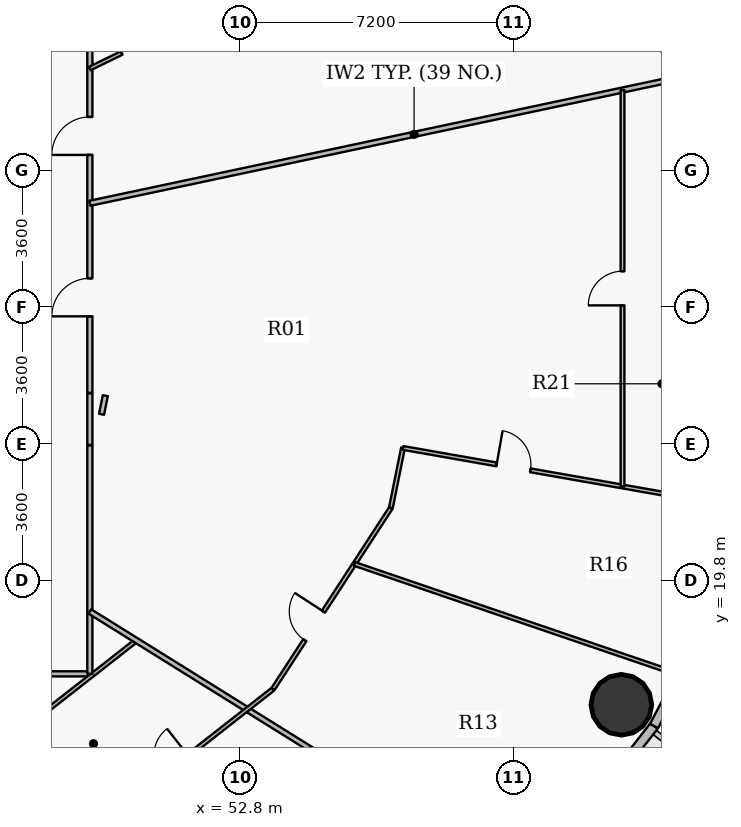
"""IFC4 building model, lengths in metres.
Left out: names, types, materials, properties, quantities, classifications, styles, units other than length and angle.
Written with IfcOpenShell. Run it as: python <this file> out.ifc"""

import sys

from ifc_helpers import new_model, si_unit, direction, frame, frame_2d, origin, origin_2d, place, context, subcontext, project, spatial, rectangle, hollow_circle, extrude, source, transform, mapped, element, fill, save


model = new_model("IFC4")
c1 = context("Model", 3, precision=1e-05, world=origin(), true_north=direction((0.0, 1.0)))
c2 = subcontext(c1, "Body", "Model", "MODEL_VIEW")
j1 = project(units=[si_unit("LENGTHUNIT", "METRE"), si_unit("PLANEANGLEUNIT", "RADIAN")], contexts=[c1])
p1 = place(None, origin())
s1 = spatial("IfcSite", under=j1, at=p1, CompositionType="ELEMENT")
p2 = place(p1, origin())
s2 = spatial("IfcBuilding", under=s1, at=p2, CompositionType="ELEMENT")
p3 = place(p2, frame((0.0, 0.0, 66.0)))
s3 = spatial("IfcBuildingStorey", under=s2, at=p3, CompositionType="ELEMENT", Elevation=66.0)
for number, where, z_axis, x_axis in (
    (1, (64.611, 34.109, 0.0), (0.0, 0.0, 1.0), (1.0, 0.0, 0.0)),
    (2, (62.835, 16.536, 0.0), (0.0, 0.0, 1.0), (1.0, 0.0, 0.0)),
):
    element("IfcColumn", number, at=place(p3, frame(where, z_axis=z_axis, x_axis=x_axis)), inside=s3, PredefinedType="COLUMN", context=c2, shape_type="SweptSolid", body=[
        extrude(hollow_circle(Radius=0.8, WallThickness=0.045, at=origin_2d()), origin(), (0.0, 0.0, 1.0), 4.2),
    ])
p4 = place(p3, frame((63.695, 15.977, 0.0), z_axis=(0.0, 0.0, 1.0), x_axis=(-0.616295508253, -0.787514981767, 0.0)))
e3 = element("IfcWall", 3, at=p4, inside=s3, PredefinedType="SOLIDWALL", context=c2, shape_type="SweptSolid", body=[
    extrude(rectangle(XDim=4.129, YDim=0.24, at=frame_2d((2.065, 0.0))), origin(), (0.0, 0.0, 1.0), 3.95),
])
p5 = place(p4, frame((1.44, 0.0, 0.9)))
e4 = element("IfcOpeningElement", 4, at=p5, cuts=e3, PredefinedType="OPENING", context=c2, shape_type="SweptSolid", body=[
    extrude(rectangle(XDim=1.25, YDim=1.65, at=origin_2d()), frame((0.625, 0.13, 0.825), z_axis=(0.0, -1.0, 0.0), x_axis=(1.0, 0.0, 0.0)), (0.0, 0.0, 1.0), 0.26),
])
p6 = place(p3, frame((65.558, 19.499, 0.0), z_axis=(0.0, 0.0, 1.0), x_axis=(-0.467662443071, -0.883907144072, 0.0)))
e5 = element("IfcWall", 5, at=p6, inside=s3, PredefinedType="SOLIDWALL", context=c2, shape_type="SweptSolid", body=[
    extrude(rectangle(XDim=3.984, YDim=0.24, at=frame_2d((1.992, 0.0))), origin(), (0.0, 0.0, 1.0), 3.95),
])
p7 = place(p6, frame((0.817, 0.0, 0.9)))
e6 = element("IfcOpeningElement", 6, at=p7, cuts=e5, PredefinedType="OPENING", context=c2, shape_type="SweptSolid", body=[
    extrude(rectangle(XDim=1.25, YDim=1.65, at=origin_2d()), frame((0.625, 0.13, 0.825), z_axis=(0.0, -1.0, 0.0), x_axis=(1.0, 0.0, 0.0)), (0.0, 0.0, 1.0), 0.26),
])
p8 = place(p3, frame((37.362, 17.35, 0.0), z_axis=(0.0, 0.0, 1.0), x_axis=(1.0, 0.0, 0.0)))
e7 = element("IfcWall", 7, at=p8, inside=s3, PredefinedType="PARTITIONING", context=c2, shape_type="SweptSolid", body=[
    extrude(rectangle(XDim=11.488, YDim=0.135, at=frame_2d((5.744, 0.0))), origin(), (0.0, 0.0, 1.0), 3.285),
])
p9 = place(p8, frame((1.625, 0.0, 0.0)))
e8 = element("IfcOpeningElement", 8, at=p9, cuts=e7, PredefinedType="OPENING", context=c2, shape_type="SweptSolid", body=[
    extrude(rectangle(XDim=1.0, YDim=2.15, at=origin_2d()), frame((0.5, 0.078, 1.075), z_axis=(0.0, -1.0, 0.0), x_axis=(1.0, 0.0, 0.0)), (0.0, 0.0, 1.0), 0.155),
])
p10 = place(p8, frame((5.589, 0.0, 0.0)))
e9 = element("IfcOpeningElement", 9, at=p10, cuts=e7, PredefinedType="OPENING", context=c2, shape_type="SweptSolid", body=[
    extrude(rectangle(XDim=1.0, YDim=2.15, at=origin_2d()), frame((0.5, 0.078, 1.075), z_axis=(0.0, -1.0, 0.0), x_axis=(1.0, 0.0, 0.0)), (0.0, 0.0, 1.0), 0.155),
])
p11 = place(p3, frame((41.572, 17.35, 0.0), z_axis=(0.0, 0.0, 1.0), x_axis=(0.499990052844, -0.866031146701, 0.0)))
e10 = element("IfcWall", 10, at=p11, inside=s3, PredefinedType="PARTITIONING", context=c2, shape_type="SweptSolid", body=[
    extrude(rectangle(XDim=14.373, YDim=0.135, at=frame_2d((7.187, 0.0))), origin(), (0.0, 0.0, 1.0), 3.335),
])
p12 = place(p3, frame((45.33, 17.35, 0.0), z_axis=(0.0, 0.0, 1.0), x_axis=(0.695082659364, -0.718929827348, 0.0)))
e11 = element("IfcWall", 11, at=p12, inside=s3, PredefinedType="PARTITIONING", context=c2, shape_type="SweptSolid", body=[
    extrude(rectangle(XDim=5.487, YDim=0.1, at=frame_2d((2.744, 0.0))), origin(), (0.0, 0.0, 1.0), 3.95),
])
p13 = place(p12, frame((1.1, 0.0, 0.0)))
e12 = element("IfcOpeningElement", 12, at=p13, cuts=e11, PredefinedType="OPENING", context=c2, shape_type="SweptSolid", body=[
    extrude(rectangle(XDim=0.82, YDim=2.1, at=origin_2d()), frame((0.41, 0.06, 1.05), z_axis=(0.0, -1.0, 0.0), x_axis=(1.0, 0.0, 0.0)), (0.0, 0.0, 1.0), 0.12),
])
p14 = place(p3, frame((46.891, 15.736, 0.0), z_axis=(0.0, 0.0, 1.0), x_axis=(0.787335515078, 0.61652476568, 0.0)))
e13 = element("IfcWall", 13, at=p14, inside=s3, PredefinedType="PARTITIONING", context=c2, shape_type="SweptSolid", body=[
    extrude(rectangle(XDim=4.043, YDim=0.1, at=frame_2d((2.022, 0.0))), origin(), (0.0, 0.0, 1.0), 3.285),
])
p15 = place(p3, frame((48.85, 17.35, 0.0), z_axis=(0.0, 0.0, 1.0), x_axis=(0.0, 1.0, 0.0)))
e14 = element("IfcWall", 14, at=p15, inside=s3, PredefinedType="PARTITIONING", context=c2, shape_type="SweptSolid", body=[
    extrude(rectangle(XDim=6.011, YDim=0.135, at=frame_2d((3.006, 0.0))), origin(), (0.0, 0.0, 1.0), 3.285),
])
p16 = place(p3, frame((48.85, 18.991, 0.0), z_axis=(0.0, 0.0, 1.0), x_axis=(0.848674864049, -0.528914903488, 0.0)))
e15 = element("IfcWall", 15, at=p16, inside=s3, PredefinedType="PARTITIONING", context=c2, shape_type="SweptSolid", body=[
    extrude(rectangle(XDim=13.427, YDim=0.135, at=frame_2d((6.714, 0.0))), origin(), (0.0, 0.0, 1.0), 3.335),
])
p17 = place(p3, frame((48.85, 24.742, 0.0), z_axis=(0.0, 0.0, 1.0), x_axis=(0.0, 1.0, 0.0)))
e16 = element("IfcWall", 16, at=p17, inside=s3, PredefinedType="PARTITIONING", context=c2, shape_type="SweptSolid", body=[
    extrude(rectangle(XDim=11.908, YDim=0.135, at=frame_2d((5.954, 0.0))), origin(), (0.0, 0.0, 1.0), 3.285),
])
p18 = place(p17, frame((6.262, 0.0, 0.0)))
e17 = element("IfcOpeningElement", 17, at=p18, cuts=e16, PredefinedType="OPENING", context=c2, shape_type="SweptSolid", body=[
    extrude(rectangle(XDim=1.0, YDim=2.15, at=origin_2d()), frame((0.5, 0.078, 1.075), z_axis=(0.0, -1.0, 0.0), x_axis=(1.0, 0.0, 0.0)), (0.0, 0.0, 1.0), 0.155),
])
p19 = place(p17, frame((2.015, 0.0, 0.0)))
e18 = element("IfcOpeningElement", 18, at=p19, cuts=e16, PredefinedType="OPENING", context=c2, shape_type="SweptSolid", body=[
    extrude(rectangle(XDim=1.0, YDim=2.15, at=origin_2d()), frame((0.5, 0.078, 1.075), z_axis=(0.0, -1.0, 0.0), x_axis=(1.0, 0.0, 0.0)), (0.0, 0.0, 1.0), 0.155),
])
p20 = place(p3, frame((48.85, 29.731, 0.0), z_axis=(0.0, 0.0, 1.0), x_axis=(0.97814985104, 0.207901103679, 0.0)))
e19 = element("IfcWall", 19, at=p20, inside=s3, PredefinedType="PARTITIONING", context=c2, shape_type="SweptSolid", body=[
    extrude(rectangle(XDim=17.444, YDim=0.135, at=frame_2d((8.722, 0.0))), origin(), (0.0, 0.0, 1.0), 3.335),
])
p21 = place(p3, frame((48.85, 33.277, 0.0), z_axis=(0.0, 0.0, 1.0), x_axis=(0.898537268474, 0.438897228476, 0.0)))
e20 = element("IfcWall", 20, at=p21, inside=s3, PredefinedType="PARTITIONING", context=c2, shape_type="SweptSolid", body=[
    extrude(rectangle(XDim=6.144, YDim=0.1, at=frame_2d((3.072, 0.0))), origin(), (0.0, 0.0, 1.0), 3.95),
])
p22 = place(p21, frame((0.93, 0.0, 0.0)))
e21 = element("IfcOpeningElement", 21, at=p22, cuts=e20, PredefinedType="OPENING", context=c2, shape_type="SweptSolid", body=[
    extrude(rectangle(XDim=0.82, YDim=2.1, at=origin_2d()), frame((0.41, 0.06, 1.05), z_axis=(0.0, -1.0, 0.0), x_axis=(1.0, 0.0, 0.0)), (0.0, 0.0, 1.0), 0.12),
])
p23 = place(p3, frame((49.144, 13.405, 0.0), z_axis=(0.0, 0.0, 1.0), x_axis=(0.787337339938, 0.616522435228, 0.0)))
e22 = element("IfcWall", 22, at=p23, inside=s3, PredefinedType="PARTITIONING", context=c2, shape_type="SweptSolid", body=[
    extrude(rectangle(XDim=5.747, YDim=0.1, at=frame_2d((2.874, 0.0))), origin(), (0.0, 0.0, 1.0), 3.285),
])
p24 = place(p23, frame((2.01, 0.0, 0.0)))
e23 = element("IfcOpeningElement", 23, at=p24, cuts=e22, PredefinedType="OPENING", context=c2, shape_type="SweptSolid", body=[
    extrude(rectangle(XDim=0.9, YDim=2.1, at=origin_2d()), frame((0.45, 0.06, 1.05), z_axis=(0.0, -1.0, 0.0), x_axis=(1.0, 0.0, 0.0)), (0.0, 0.0, 1.0), 0.12),
])
p25 = place(p3, frame((53.669, 16.948, 0.0), z_axis=(0.0, 0.0, 1.0), x_axis=(0.545413765252, 0.8381669432, 0.0)))
e24 = element("IfcWall", 24, at=p25, inside=s3, PredefinedType="PARTITIONING", context=c2, shape_type="SweptSolid", body=[
    extrude(rectangle(XDim=5.688, YDim=0.1, at=frame_2d((2.844, 0.0))), origin(), (0.0, 0.0, 1.0), 3.285),
])
p26 = place(p25, frame((1.535, 0.0, 0.0)))
e25 = element("IfcOpeningElement", 25, at=p26, cuts=e24, PredefinedType="OPENING", context=c2, shape_type="SweptSolid", body=[
    extrude(rectangle(XDim=0.9, YDim=2.1, at=origin_2d()), frame((0.45, 0.06, 1.05), z_axis=(0.0, -1.0, 0.0), x_axis=(1.0, 0.0, 0.0)), (0.0, 0.0, 1.0), 0.12),
])
p27 = place(p3, frame((55.812, 20.242, 0.0), z_axis=(0.0, 0.0, 1.0), x_axis=(0.946449887069, -0.322850756955, 0.0)))
e26 = element("IfcWall", 26, at=p27, inside=s3, PredefinedType="PARTITIONING", context=c2, shape_type="SweptSolid", body=[
    extrude(rectangle(XDim=9.08, YDim=0.1, at=frame_2d((4.54, 0.0))), origin(), (0.0, 0.0, 1.0), 3.335),
])
p28 = place(p3, frame((56.771, 21.716, 0.0), z_axis=(0.0, 0.0, 1.0), x_axis=(0.198302290641, 0.980140909016, 0.0)))
e27 = element("IfcWall", 27, at=p28, inside=s3, PredefinedType="PARTITIONING", context=c2, shape_type="SweptSolid", body=[
    extrude(rectangle(XDim=1.61, YDim=0.1, at=frame_2d((0.805, 0.0))), origin(), (0.0, 0.0, 1.0), 3.95),
])
p29 = place(p3, frame((57.09, 23.294, 0.0), z_axis=(0.0, 0.0, 1.0), x_axis=(0.984913803966, -0.173045655125, 0.0)))
e28 = element("IfcWall", 28, at=p29, inside=s3, PredefinedType="PARTITIONING", context=c2, shape_type="SweptSolid", body=[
    extrude(rectangle(XDim=9.283, YDim=0.1, at=frame_2d((4.642, 0.0))), origin(), (0.0, 0.0, 1.0), 3.335),
])
p30 = place(p29, frame((2.502, 0.0, 0.0)))
e29 = element("IfcOpeningElement", 29, at=p30, cuts=e28, PredefinedType="OPENING", context=c2, shape_type="SweptSolid", body=[
    extrude(rectangle(XDim=0.9, YDim=2.1, at=origin_2d()), frame((0.45, 0.06, 1.05), z_axis=(0.0, -1.0, 0.0), x_axis=(1.0, 0.0, 0.0)), (0.0, 0.0, 1.0), 0.12),
])
p31 = place(p29, frame((8.115, 0.0, 0.0)))
e30 = element("IfcOpeningElement", 30, at=p31, cuts=e28, PredefinedType="OPENING", context=c2, shape_type="SweptSolid", body=[
    extrude(rectangle(XDim=0.82, YDim=2.1, at=origin_2d()), frame((0.41, 0.06, 1.05), z_axis=(0.0, -1.0, 0.0), x_axis=(1.0, 0.0, 0.0)), (0.0, 0.0, 1.0), 0.12),
])
p32 = place(p3, frame((62.867, 22.279, 0.0), z_axis=(0.0, 0.0, 1.0), x_axis=(0.0, 1.0, 0.0)))
e31 = element("IfcWall", 31, at=p32, inside=s3, PredefinedType="PARTITIONING", context=c2, shape_type="SweptSolid", body=[
    extrude(rectangle(XDim=10.432, YDim=0.1, at=frame_2d((5.216, 0.0))), origin(), (0.0, 0.0, 1.0), 3.285),
])
p33 = place(p32, frame((4.766, 0.0, 0.0)))
e32 = element("IfcOpeningElement", 32, at=p33, cuts=e31, PredefinedType="OPENING", context=c2, shape_type="SweptSolid", body=[
    extrude(rectangle(XDim=0.9, YDim=2.1, at=origin_2d()), frame((0.45, 0.06, 1.05), z_axis=(0.0, -1.0, 0.0), x_axis=(1.0, 0.0, 0.0)), (0.0, 0.0, 1.0), 0.12),
])
p34 = place(p3, frame((48.85, 24.732, 0.0), z_axis=(0.0, 0.0, 1.0), x_axis=(0.0, -1.0, 0.0)))
e33 = element("IfcWall", 33, at=p34, inside=s3, PredefinedType="PARTITIONING", context=c2, shape_type="SweptSolid", body=[
    extrude(rectangle(XDim=1.36, YDim=0.135, at=frame_2d((0.68, 0.0))), origin(), (0.0, 0.0, 1.0), 3.95),
])
p35 = place(p3, frame((49.157, 24.18, 0.0), z_axis=(0.0, 0.0, 1.0), x_axis=(0.198365081381, 0.980128203088, 0.0)))
e34 = element("IfcWall", 34, at=p35, inside=s3, PredefinedType="PARTITIONING", context=c2, shape_type="SweptSolid", body=[
    extrude(rectangle(XDim=0.501, YDim=0.135, at=frame_2d((0.25, 0.0))), origin(), (0.0, 0.0, 1.0), 3.95),
])
m1 = source(origin(), c2, "Body", "SweptSolid", [
    extrude(rectangle(XDim=1.0, YDim=2.15, at=origin_2d()), frame((0.5, 0.025, 1.075), z_axis=(0.0, -1.0, 0.0), x_axis=(1.0, 0.0, 0.0)), (0.0, 0.0, 1.0), 0.05),
])
p36 = place(p18, origin())
e35 = element("IfcDoor", 35, at=p36, inside=s3, OperationType="SINGLE_SWING_LEFT", PredefinedType="DOOR", context=c2, shape_type="MappedRepresentation", body=[
    mapped(m1, transform((0.0, 0.0, 0.0), x_axis=(1.0, 0.0, 0.0), y_axis=(0.0, 1.0, 0.0), z_axis=(0.0, 0.0, 1.0), scale=1.0)),
])
fill(e17, e35)
m2 = source(origin(), c2, "Body", "SweptSolid", [
    extrude(rectangle(XDim=0.82, YDim=2.1, at=origin_2d()), frame((0.41, 0.025, 1.05), z_axis=(0.0, -1.0, 0.0), x_axis=(1.0, 0.0, 0.0)), (0.0, 0.0, 1.0), 0.05),
])
p37 = place(p22, origin())
e36 = element("IfcDoor", 36, at=p37, inside=s3, OperationType="SINGLE_SWING_RIGHT", PredefinedType="DOOR", context=c2, shape_type="MappedRepresentation", body=[
    mapped(m2, transform((0.0, 0.0, 0.0), x_axis=(1.0, 0.0, 0.0), y_axis=(0.0, 1.0, 0.0), z_axis=(0.0, 0.0, 1.0), scale=1.0)),
])
fill(e21, e36)
p38 = place(p19, origin())
e37 = element("IfcDoor", 37, at=p38, inside=s3, OperationType="SINGLE_SWING_LEFT", PredefinedType="DOOR", context=c2, shape_type="MappedRepresentation", body=[
    mapped(m1, transform((0.0, 0.0, 0.0), x_axis=(1.0, 0.0, 0.0), y_axis=(0.0, 1.0, 0.0), z_axis=(0.0, 0.0, 1.0), scale=1.0)),
])
fill(e18, e37)
m3 = source(origin(), c2, "Body", "SweptSolid", [
    extrude(rectangle(XDim=0.9, YDim=2.1, at=origin_2d()), frame((0.45, 0.025, 1.05), z_axis=(0.0, -1.0, 0.0), x_axis=(1.0, 0.0, 0.0)), (0.0, 0.0, 1.0), 0.05),
])
p39 = place(p26, origin())
e38 = element("IfcDoor", 38, at=p39, inside=s3, OperationType="SINGLE_SWING_RIGHT", PredefinedType="DOOR", context=c2, shape_type="MappedRepresentation", body=[
    mapped(m3, transform((0.0, 0.0, 0.0), x_axis=(1.0, 0.0, 0.0), y_axis=(0.0, 1.0, 0.0), z_axis=(0.0, 0.0, 1.0), scale=1.0)),
])
fill(e25, e38)
p40 = place(p30, origin())
e39 = element("IfcDoor", 39, at=p40, inside=s3, OperationType="SINGLE_SWING_LEFT", PredefinedType="DOOR", context=c2, shape_type="MappedRepresentation", body=[
    mapped(m3, transform((0.0, 0.0, 0.0), x_axis=(1.0, 0.0, 0.0), y_axis=(0.0, 1.0, 0.0), z_axis=(0.0, 0.0, 1.0), scale=1.0)),
])
fill(e29, e39)
p41 = place(p33, origin())
e40 = element("IfcDoor", 40, at=p41, inside=s3, OperationType="SINGLE_SWING_LEFT", PredefinedType="DOOR", context=c2, shape_type="MappedRepresentation", body=[
    mapped(m3, transform((0.0, 0.0, 0.0), x_axis=(1.0, 0.0, 0.0), y_axis=(0.0, 1.0, 0.0), z_axis=(0.0, 0.0, 1.0), scale=1.0)),
])
fill(e32, e40)
save(model, sys.argv[1])
